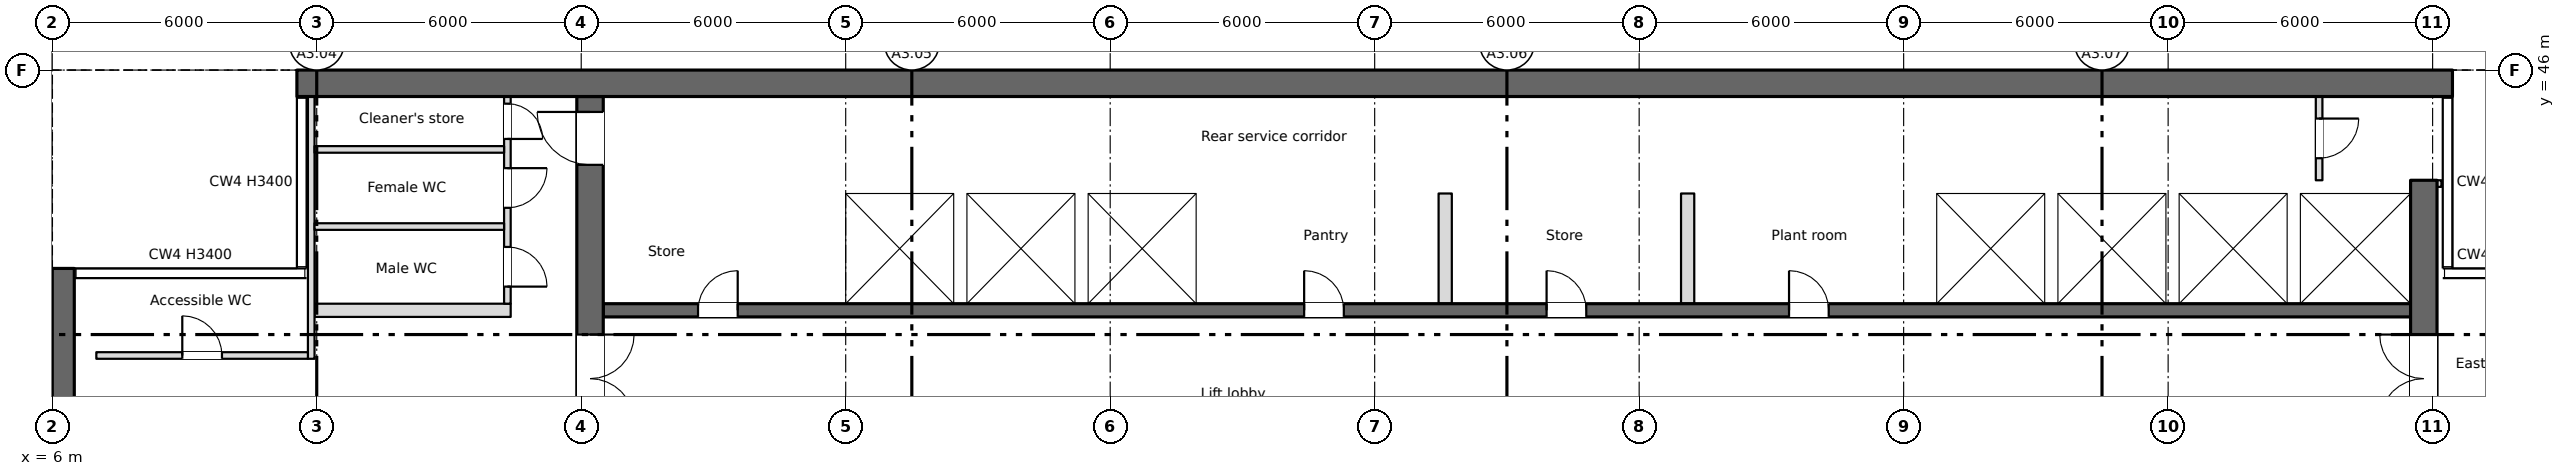
"""IFC4 building model, lengths in metres.
Left out: names, types, materials, properties, quantities, classifications, styles, units other than length and angle.
Written with IfcOpenShell. Run it as: python <this file> out.ifc"""

import sys

from ifc_helpers import new_model, si_unit, direction, frame, frame_2d, origin, place, context, subcontext, project, spatial, rectangle, extrude, element, fill, save


model = new_model("IFC4")
c1 = context("Model", 3, precision=1e-05, world=origin(), true_north=direction((0.0, 1.0)))
c2 = subcontext(c1, "Body", "Model", "MODEL_VIEW")
j1 = project(units=[si_unit("LENGTHUNIT", "METRE"), si_unit("PLANEANGLEUNIT", "RADIAN")], contexts=[c1])
p1 = place(None, origin())
s1 = spatial("IfcSite", under=j1, at=p1, CompositionType="ELEMENT")
p2 = place(p1, origin())
s2 = spatial("IfcBuilding", under=s1, at=p2, CompositionType="ELEMENT")
p3 = place(p2, frame((0.0, 0.0, 250.75)))
s3 = spatial("IfcBuildingStorey", under=s2, at=p3, CompositionType="ELEMENT", Elevation=250.75)
p4 = place(p3, frame((6.25, 8.5, 0.0), z_axis=(0.0, 0.0, 1.0), x_axis=(0.0, 1.0, 0.0)))
e1 = element("IfcWall", 1, at=p4, inside=s3, PredefinedType="SHEAR", context=c2, shape_type="SweptSolid", body=[
    extrude(rectangle(XDim=33.0, YDim=0.5, at=frame_2d((16.5, 0.0))), origin(), (0.0, 0.0, 1.0), 3.4),
])
p5 = place(p4, frame((1.2, 0.0, 0.6)))
e2 = element("IfcOpeningElement", 2, at=p5, cuts=e1, PredefinedType="OPENING", context=c2, shape_type="SweptSolid", body=[
    extrude(rectangle(XDim=0.6, YDim=2.4, at=frame_2d((0.3, 1.2))), frame((0.0, 0.26, 0.0), z_axis=(0.0, -1.0, 0.0), x_axis=(1.0, 0.0, 0.0)), (0.0, 0.0, 1.0), 0.52),
])
p6 = place(p4, frame((7.2, 0.0, 0.6)))
e3 = element("IfcOpeningElement", 3, at=p6, cuts=e1, PredefinedType="OPENING", context=c2, shape_type="SweptSolid", body=[
    extrude(rectangle(XDim=0.6, YDim=2.4, at=frame_2d((0.3, 1.2))), frame((0.0, 0.26, 0.0), z_axis=(0.0, -1.0, 0.0), x_axis=(1.0, 0.0, 0.0)), (0.0, 0.0, 1.0), 0.52),
])
p7 = place(p4, frame((13.2, 0.0, 0.6)))
e4 = element("IfcOpeningElement", 4, at=p7, cuts=e1, PredefinedType="OPENING", context=c2, shape_type="SweptSolid", body=[
    extrude(rectangle(XDim=0.6, YDim=2.4, at=frame_2d((0.3, 1.2))), frame((0.0, 0.26, 0.0), z_axis=(0.0, -1.0, 0.0), x_axis=(1.0, 0.0, 0.0)), (0.0, 0.0, 1.0), 0.52),
])
p8 = place(p3, frame((11.55, 45.7, 0.0), z_axis=(0.0, 0.0, 1.0), x_axis=(1.0, 0.0, 0.0)))
e5 = element("IfcWall", 5, at=p8, inside=s3, PredefinedType="SHEAR", context=c2, shape_type="SweptSolid", body=[
    extrude(rectangle(XDim=48.9, YDim=0.6, at=frame_2d((24.45, 0.0))), origin(), (0.0, 0.0, 1.0), 3.4),
])
p9 = place(p3, frame((6.75, 28.4, 0.0), z_axis=(0.0, 0.0, 1.0), x_axis=(0.0, 1.0, 0.0)))
e6 = element("IfcWall", 6, at=p9, inside=s3, PredefinedType="SHEAR", context=c2, shape_type="SweptSolid", body=[
    extrude(rectangle(XDim=12.85, YDim=0.5, at=frame_2d((6.425, 0.0))), origin(), (0.0, 0.0, 1.0), 3.4),
])
p10 = place(p3, frame((18.2, 28.4, 0.0), z_axis=(0.0, 0.0, 1.0), x_axis=(0.0, 1.0, 0.0)))
e7 = element("IfcWall", 7, at=p10, inside=s3, PredefinedType="SHEAR", context=c2, shape_type="SweptSolid", body=[
    extrude(rectangle(XDim=17.0, YDim=0.6, at=frame_2d((8.5, 0.0))), origin(), (0.0, 0.0, 1.0), 3.4),
])
p11 = place(p10, frame((9.6, 0.0, 0.0)))
e8 = element("IfcOpeningElement", 8, at=p11, cuts=e7, PredefinedType="OPENING", context=c2, shape_type="SweptSolid", body=[
    extrude(rectangle(XDim=2.0, YDim=2.1, at=frame_2d((1.0, 1.05))), frame((0.0, 0.31, 0.0), z_axis=(0.0, -1.0, 0.0), x_axis=(1.0, 0.0, 0.0)), (0.0, 0.0, 1.0), 0.62),
])
p12 = place(p10, frame((15.45, 0.0, 0.0)))
e9 = element("IfcOpeningElement", 9, at=p12, cuts=e7, PredefinedType="OPENING", context=c2, shape_type="SweptSolid", body=[
    extrude(rectangle(XDim=1.2, YDim=2.1, at=frame_2d((0.6, 1.05))), frame((0.0, 0.31, 0.0), z_axis=(0.0, -1.0, 0.0), x_axis=(1.0, 0.0, 0.0)), (0.0, 0.0, 1.0), 0.62),
])
p13 = place(p3, frame((59.8, 28.4, 0.0), z_axis=(0.0, 0.0, 1.0), x_axis=(0.0, 1.0, 0.0)))
e10 = element("IfcWall", 10, at=p13, inside=s3, PredefinedType="SHEAR", context=c2, shape_type="SweptSolid", body=[
    extrude(rectangle(XDim=15.1, YDim=0.6, at=frame_2d((7.55, 0.0))), origin(), (0.0, 0.0, 1.0), 3.4),
])
p14 = place(p13, frame((9.6, 0.0, 0.0)))
e11 = element("IfcOpeningElement", 11, at=p14, cuts=e10, PredefinedType="OPENING", context=c2, shape_type="SweptSolid", body=[
    extrude(rectangle(XDim=2.0, YDim=2.1, at=frame_2d((1.0, 1.05))), frame((0.0, 0.31, 0.0), z_axis=(0.0, -1.0, 0.0), x_axis=(1.0, 0.0, 0.0)), (0.0, 0.0, 1.0), 0.62),
])
p15 = place(p3, frame((18.5, 40.55, 0.0), z_axis=(0.0, 0.0, 1.0), x_axis=(1.0, 0.0, 0.0)))
e12 = element("IfcWall", 12, at=p15, inside=s3, PredefinedType="SHEAR", context=c2, shape_type="SweptSolid", body=[
    extrude(rectangle(XDim=41.0, YDim=0.3, at=frame_2d((20.5, 0.0))), origin(), (0.0, 0.0, 1.0), 3.4),
])
p16 = place(p15, frame((2.15, 0.0, 0.0)))
e13 = element("IfcOpeningElement", 13, at=p16, cuts=e12, PredefinedType="OPENING", context=c2, shape_type="SweptSolid", body=[
    extrude(rectangle(XDim=0.9, YDim=2.1, at=frame_2d((0.45, 1.05))), frame((0.0, 0.16, 0.0), z_axis=(0.0, -1.0, 0.0), x_axis=(1.0, 0.0, 0.0)), (0.0, 0.0, 1.0), 0.32),
])
p17 = place(p15, frame((15.9, 0.0, 0.0)))
e14 = element("IfcOpeningElement", 14, at=p17, cuts=e12, PredefinedType="OPENING", context=c2, shape_type="SweptSolid", body=[
    extrude(rectangle(XDim=0.9, YDim=2.1, at=frame_2d((0.45, 1.05))), frame((0.0, 0.16, 0.0), z_axis=(0.0, -1.0, 0.0), x_axis=(1.0, 0.0, 0.0)), (0.0, 0.0, 1.0), 0.32),
])
p18 = place(p15, frame((21.4, 0.0, 0.0)))
e15 = element("IfcOpeningElement", 15, at=p18, cuts=e12, PredefinedType="OPENING", context=c2, shape_type="SweptSolid", body=[
    extrude(rectangle(XDim=0.9, YDim=2.1, at=frame_2d((0.45, 1.05))), frame((0.0, 0.16, 0.0), z_axis=(0.0, -1.0, 0.0), x_axis=(1.0, 0.0, 0.0)), (0.0, 0.0, 1.0), 0.32),
])
p19 = place(p15, frame((26.9, 0.0, 0.0)))
e16 = element("IfcOpeningElement", 16, at=p19, cuts=e12, PredefinedType="OPENING", context=c2, shape_type="SweptSolid", body=[
    extrude(rectangle(XDim=0.9, YDim=2.1, at=frame_2d((0.45, 1.05))), frame((0.0, 0.16, 0.0), z_axis=(0.0, -1.0, 0.0), x_axis=(1.0, 0.0, 0.0)), (0.0, 0.0, 1.0), 0.32),
])
p20 = place(p15, frame((6.175, 0.0, 0.0)))
e17 = element("IfcOpeningElement", 17, at=p20, cuts=e12, PredefinedType="OPENING", context=c2, shape_type="SweptSolid", body=[
    extrude(rectangle(XDim=1.1, YDim=2.1, at=frame_2d((0.55, 1.05))), frame((0.0, 0.16, 0.0), z_axis=(0.0, -1.0, 0.0), x_axis=(1.0, 0.0, 0.0)), (0.0, 0.0, 1.0), 0.32),
])
p21 = place(p15, frame((8.925, 0.0, 0.0)))
e18 = element("IfcOpeningElement", 18, at=p21, cuts=e12, PredefinedType="OPENING", context=c2, shape_type="SweptSolid", body=[
    extrude(rectangle(XDim=1.1, YDim=2.1, at=frame_2d((0.55, 1.05))), frame((0.0, 0.16, 0.0), z_axis=(0.0, -1.0, 0.0), x_axis=(1.0, 0.0, 0.0)), (0.0, 0.0, 1.0), 0.32),
])
p22 = place(p15, frame((11.675, 0.0, 0.0)))
e19 = element("IfcOpeningElement", 19, at=p22, cuts=e12, PredefinedType="OPENING", context=c2, shape_type="SweptSolid", body=[
    extrude(rectangle(XDim=1.1, YDim=2.1, at=frame_2d((0.55, 1.05))), frame((0.0, 0.16, 0.0), z_axis=(0.0, -1.0, 0.0), x_axis=(1.0, 0.0, 0.0)), (0.0, 0.0, 1.0), 0.32),
])
p23 = place(p15, frame((30.925, 0.0, 0.0)))
e20 = element("IfcOpeningElement", 20, at=p23, cuts=e12, PredefinedType="OPENING", context=c2, shape_type="SweptSolid", body=[
    extrude(rectangle(XDim=1.1, YDim=2.1, at=frame_2d((0.55, 1.05))), frame((0.0, 0.16, 0.0), z_axis=(0.0, -1.0, 0.0), x_axis=(1.0, 0.0, 0.0)), (0.0, 0.0, 1.0), 0.32),
])
p24 = place(p15, frame((33.675, 0.0, 0.0)))
e21 = element("IfcOpeningElement", 21, at=p24, cuts=e12, PredefinedType="OPENING", context=c2, shape_type="SweptSolid", body=[
    extrude(rectangle(XDim=1.1, YDim=2.1, at=frame_2d((0.55, 1.05))), frame((0.0, 0.16, 0.0), z_axis=(0.0, -1.0, 0.0), x_axis=(1.0, 0.0, 0.0)), (0.0, 0.0, 1.0), 0.32),
])
p25 = place(p15, frame((36.375, 0.0, 0.0)))
e22 = element("IfcOpeningElement", 22, at=p25, cuts=e12, PredefinedType="OPENING", context=c2, shape_type="SweptSolid", body=[
    extrude(rectangle(XDim=1.2, YDim=2.1, at=frame_2d((0.6, 1.05))), frame((0.0, 0.16, 0.0), z_axis=(0.0, -1.0, 0.0), x_axis=(1.0, 0.0, 0.0)), (0.0, 0.0, 1.0), 0.32),
])
p26 = place(p15, frame((39.15, 0.0, 0.0)))
e23 = element("IfcOpeningElement", 23, at=p26, cuts=e12, PredefinedType="OPENING", context=c2, shape_type="SweptSolid", body=[
    extrude(rectangle(XDim=1.2, YDim=2.1, at=frame_2d((0.6, 1.05))), frame((0.0, 0.16, 0.0), z_axis=(0.0, -1.0, 0.0), x_axis=(1.0, 0.0, 0.0)), (0.0, 0.0, 1.0), 0.32),
])
p27 = place(p3, frame((18.5, 43.35, 0.0), z_axis=(0.0, 0.0, 1.0), x_axis=(1.0, 0.0, 0.0)))
e24 = element("IfcWall", 24, at=p27, inside=s3, PredefinedType="SHEAR", context=c2, shape_type="SweptSolid", body=[
    extrude(rectangle(XDim=41.0, YDim=0.3, at=frame_2d((20.5, 0.0))), origin(), (0.0, 0.0, 1.0), 3.4),
])
p28 = place(p3, frame((11.95, 40.55, 0.0), z_axis=(0.0, 0.0, 1.0), x_axis=(1.0, 0.0, 0.0)))
e25 = element("IfcWall", 25, at=p28, inside=s3, PredefinedType="PARTITIONING", context=c2, shape_type="SweptSolid", body=[
    extrude(rectangle(XDim=4.45, YDim=0.3, at=frame_2d((2.225, 0.0))), origin(), (0.0, 0.0, 1.0), 3.4),
])
for number, where, z_axis, x_axis in (
    (26, (23.85, 40.7, 0.0), (0.0, 0.0, 1.0), (0.0, 1.0, 0.0)),
    (27, (26.6, 40.7, 0.0), (0.0, 0.0, 1.0), (0.0, 1.0, 0.0)),
    (28, (29.35, 40.7, 0.0), (0.0, 0.0, 1.0), (0.0, 1.0, 0.0)),
    (29, (32.1, 40.7, 0.0), (0.0, 0.0, 1.0), (0.0, 1.0, 0.0)),
    (30, (48.6, 40.7, 0.0), (0.0, 0.0, 1.0), (0.0, 1.0, 0.0)),
    (31, (51.35, 40.7, 0.0), (0.0, 0.0, 1.0), (0.0, 1.0, 0.0)),
    (32, (54.1, 40.7, 0.0), (0.0, 0.0, 1.0), (0.0, 1.0, 0.0)),
    (33, (56.85, 40.7, 0.0), (0.0, 0.0, 1.0), (0.0, 1.0, 0.0)),
):
    element("IfcWall", number, at=place(p3, frame(where, z_axis=z_axis, x_axis=x_axis)), inside=s3, PredefinedType="SHEAR", context=c2, shape_type="SweptSolid", body=[
        extrude(rectangle(XDim=2.5, YDim=0.3, at=frame_2d((1.25, 0.0))), origin(), (0.0, 0.0, 1.0), 3.4),
    ])
p29 = place(p3, frame((16.325, 45.4, 0.0), z_axis=(0.0, 0.0, 1.0), x_axis=(0.0, -1.0, 0.0)))
e34 = element("IfcWall", 34, at=p29, inside=s3, PredefinedType="PARTITIONING", context=c2, shape_type="SweptSolid", body=[
    extrude(rectangle(XDim=4.7, YDim=0.15, at=frame_2d((2.35, 0.0))), origin(), (0.0, 0.0, 1.0), 3.4),
])
p30 = place(p29, frame((3.413, 0.0, 0.0)))
e35 = element("IfcOpeningElement", 35, at=p30, cuts=e34, PredefinedType="OPENING", context=c2, shape_type="SweptSolid", body=[
    extrude(rectangle(XDim=0.9, YDim=2.1, at=frame_2d((0.45, 1.05))), frame((0.0, 0.085, 0.0), z_axis=(0.0, -1.0, 0.0), x_axis=(1.0, 0.0, 0.0)), (0.0, 0.0, 1.0), 0.17),
])
p31 = place(p29, frame((1.625, 0.0, 0.0)))
e36 = element("IfcOpeningElement", 36, at=p31, cuts=e34, PredefinedType="OPENING", context=c2, shape_type="SweptSolid", body=[
    extrude(rectangle(XDim=0.9, YDim=2.1, at=frame_2d((0.45, 1.05))), frame((0.0, 0.085, 0.0), z_axis=(0.0, -1.0, 0.0), x_axis=(1.0, 0.0, 0.0)), (0.0, 0.0, 1.0), 0.17),
])
p32 = place(p29, frame((0.163, 0.0, 0.0)))
e37 = element("IfcOpeningElement", 37, at=p32, cuts=e34, PredefinedType="OPENING", context=c2, shape_type="SweptSolid", body=[
    extrude(rectangle(XDim=0.8, YDim=2.1, at=frame_2d((0.4, 1.05))), frame((0.0, 0.085, 0.0), z_axis=(0.0, -1.0, 0.0), x_axis=(1.0, 0.0, 0.0)), (0.0, 0.0, 1.0), 0.17),
])
p33 = place(p3, frame((11.875, 39.45, 0.0), z_axis=(0.0, 0.0, 1.0), x_axis=(0.0, 1.0, 0.0)))
e38 = element("IfcWall", 38, at=p33, inside=s3, PredefinedType="PARTITIONING", context=c2, shape_type="SweptSolid", body=[
    extrude(rectangle(XDim=5.95, YDim=0.15, at=frame_2d((2.975, 0.0))), origin(), (0.0, 0.0, 1.0), 3.4),
])
p34 = place(p3, frame((7.0, 39.525, 0.0), z_axis=(0.0, 0.0, 1.0), x_axis=(1.0, 0.0, 0.0)))
e39 = element("IfcWall", 39, at=p34, inside=s3, PredefinedType="PARTITIONING", context=c2, shape_type="SweptSolid", body=[
    extrude(rectangle(XDim=4.8, YDim=0.15, at=frame_2d((2.4, 0.0))), origin(), (0.0, 0.0, 1.0), 3.4),
])
p35 = place(p34, frame((1.95, 0.0, 0.0)))
e40 = element("IfcOpeningElement", 40, at=p35, cuts=e39, PredefinedType="OPENING", context=c2, shape_type="SweptSolid", body=[
    extrude(rectangle(XDim=0.9, YDim=2.1, at=frame_2d((0.45, 1.05))), frame((0.0, 0.085, 0.0), z_axis=(0.0, -1.0, 0.0), x_axis=(1.0, 0.0, 0.0)), (0.0, 0.0, 1.0), 0.17),
])
for number, where, z_axis, x_axis in (
    (41, (11.95, 42.45, 0.0), (0.0, 0.0, 1.0), (1.0, 0.0, 0.0)),
    (42, (11.95, 44.2, 0.0), (0.0, 0.0, 1.0), (1.0, 0.0, 0.0)),
):
    element("IfcWall", number, at=place(p3, frame(where, z_axis=z_axis, x_axis=x_axis)), inside=s3, PredefinedType="PARTITIONING", context=c2, shape_type="SweptSolid", body=[
        extrude(rectangle(XDim=4.3, YDim=0.15, at=frame_2d((2.15, 0.0))), origin(), (0.0, 0.0, 1.0), 3.4),
    ])
p36 = place(p3, frame((57.425, 45.4, 0.0), z_axis=(0.0, 0.0, 1.0), x_axis=(0.0, -1.0, 0.0)))
e43 = element("IfcWall", 43, at=p36, inside=s3, PredefinedType="PARTITIONING", context=c2, shape_type="SweptSolid", body=[
    extrude(rectangle(XDim=1.9, YDim=0.15, at=frame_2d((0.95, 0.0))), origin(), (0.0, 0.0, 1.0), 3.4),
])
p37 = place(p36, frame((0.5, 0.0, 0.0)))
e44 = element("IfcOpeningElement", 44, at=p37, cuts=e43, PredefinedType="OPENING", context=c2, shape_type="SweptSolid", body=[
    extrude(rectangle(XDim=0.9, YDim=2.1, at=frame_2d((0.45, 1.05))), frame((0.0, 0.085, 0.0), z_axis=(0.0, -1.0, 0.0), x_axis=(1.0, 0.0, 0.0)), (0.0, 0.0, 1.0), 0.17),
])
p38 = place(p3, frame((60.15, 43.35, 0.0), z_axis=(0.0, 0.0, 1.0), x_axis=(0.0, 1.0, 0.0)))
e45 = element("IfcWall", 45, at=p38, inside=s3, PredefinedType="PARTITIONING", context=c2, shape_type="SweptSolid", body=[
    extrude(rectangle(XDim=0.15, YDim=0.1, at=frame_2d((0.075, 0.0))), origin(), (0.0, 0.0, 1.0), 3.4),
])
for number, where, z_axis, x_axis in (
    (46, (37.6, 40.7, 0.0), (0.0, 0.0, 1.0), (0.0, 1.0, 0.0)),
    (47, (43.1, 40.7, 0.0), (0.0, 0.0, 1.0), (0.0, 1.0, 0.0)),
):
    element("IfcWall", number, at=place(p3, frame(where, z_axis=z_axis, x_axis=x_axis)), inside=s3, PredefinedType="PARTITIONING", context=c2, shape_type="SweptSolid", body=[
        extrude(rectangle(XDim=2.5, YDim=0.3, at=frame_2d((1.25, 0.0))), origin(), (0.0, 0.0, 1.0), 3.4),
    ])
p39 = place(p35, origin())
e48 = element("IfcDoor", 48, at=p39, inside=s3, OperationType="SINGLE_SWING_LEFT", PredefinedType="DOOR", context=c2, shape_type="SweptSolid", body=[
    extrude(rectangle(XDim=0.9, YDim=2.1, at=frame_2d((0.45, 1.05))), frame((0.0, 0.025, 0.0), z_axis=(0.0, -1.0, 0.0), x_axis=(1.0, 0.0, 0.0)), (0.0, 0.0, 1.0), 0.05),
])
fill(e40, e48)
p40 = place(p30, origin())
e49 = element("IfcDoor", 49, at=p40, inside=s3, OperationType="SINGLE_SWING_RIGHT", PredefinedType="DOOR", context=c2, shape_type="SweptSolid", body=[
    extrude(rectangle(XDim=0.9, YDim=2.1, at=frame_2d((0.45, 1.05))), frame((0.0, 0.025, 0.0), z_axis=(0.0, -1.0, 0.0), x_axis=(1.0, 0.0, 0.0)), (0.0, 0.0, 1.0), 0.05),
])
fill(e35, e49)
p41 = place(p31, origin())
e50 = element("IfcDoor", 50, at=p41, inside=s3, OperationType="SINGLE_SWING_LEFT", PredefinedType="DOOR", context=c2, shape_type="SweptSolid", body=[
    extrude(rectangle(XDim=0.9, YDim=2.1, at=frame_2d((0.45, 1.05))), frame((0.0, 0.025, 0.0), z_axis=(0.0, -1.0, 0.0), x_axis=(1.0, 0.0, 0.0)), (0.0, 0.0, 1.0), 0.05),
])
fill(e36, e50)
p42 = place(p32, origin())
e51 = element("IfcDoor", 51, at=p42, inside=s3, OperationType="SINGLE_SWING_RIGHT", PredefinedType="DOOR", context=c2, shape_type="SweptSolid", body=[
    extrude(rectangle(XDim=0.8, YDim=2.1, at=frame_2d((0.4, 1.05))), frame((0.0, 0.025, 0.0), z_axis=(0.0, -1.0, 0.0), x_axis=(1.0, 0.0, 0.0)), (0.0, 0.0, 1.0), 0.05),
])
fill(e37, e51)
p43 = place(p37, origin())
e52 = element("IfcDoor", 52, at=p43, inside=s3, OperationType="SINGLE_SWING_LEFT", PredefinedType="DOOR", context=c2, shape_type="SweptSolid", body=[
    extrude(rectangle(XDim=0.9, YDim=2.1, at=frame_2d((0.45, 1.05))), frame((0.0, 0.025, 0.0), z_axis=(0.0, -1.0, 0.0), x_axis=(1.0, 0.0, 0.0)), (0.0, 0.0, 1.0), 0.05),
])
fill(e44, e52)
p44 = place(p16, origin())
e53 = element("IfcDoor", 53, at=p44, inside=s3, OperationType="SINGLE_SWING_RIGHT", PredefinedType="DOOR", context=c2, shape_type="SweptSolid", body=[
    extrude(rectangle(XDim=0.9, YDim=2.1, at=frame_2d((0.45, 1.05))), frame((0.0, 0.025, 0.0), z_axis=(0.0, -1.0, 0.0), x_axis=(1.0, 0.0, 0.0)), (0.0, 0.0, 1.0), 0.05),
])
fill(e13, e53)
p45 = place(p17, origin())
e54 = element("IfcDoor", 54, at=p45, inside=s3, OperationType="SINGLE_SWING_LEFT", PredefinedType="DOOR", context=c2, shape_type="SweptSolid", body=[
    extrude(rectangle(XDim=0.9, YDim=2.1, at=frame_2d((0.45, 1.05))), frame((0.0, 0.025, 0.0), z_axis=(0.0, -1.0, 0.0), x_axis=(1.0, 0.0, 0.0)), (0.0, 0.0, 1.0), 0.05),
])
fill(e14, e54)
p46 = place(p18, origin())
e55 = element("IfcDoor", 55, at=p46, inside=s3, OperationType="SINGLE_SWING_LEFT", PredefinedType="DOOR", context=c2, shape_type="SweptSolid", body=[
    extrude(rectangle(XDim=0.9, YDim=2.1, at=frame_2d((0.45, 1.05))), frame((0.0, 0.025, 0.0), z_axis=(0.0, -1.0, 0.0), x_axis=(1.0, 0.0, 0.0)), (0.0, 0.0, 1.0), 0.05),
])
fill(e15, e55)
p47 = place(p19, origin())
e56 = element("IfcDoor", 56, at=p47, inside=s3, OperationType="SINGLE_SWING_LEFT", PredefinedType="DOOR", context=c2, shape_type="SweptSolid", body=[
    extrude(rectangle(XDim=0.9, YDim=2.1, at=frame_2d((0.45, 1.05))), frame((0.0, 0.025, 0.0), z_axis=(0.0, -1.0, 0.0), x_axis=(1.0, 0.0, 0.0)), (0.0, 0.0, 1.0), 0.05),
])
fill(e16, e56)
p48 = place(p20, origin())
e57 = element("IfcDoor", 57, at=p48, inside=s3, OperationType="SLIDING_TO_LEFT", PredefinedType="DOOR", context=c2, shape_type="SweptSolid", body=[
    extrude(rectangle(XDim=1.1, YDim=2.1, at=frame_2d((0.55, 1.05))), frame((0.0, 0.025, 0.0), z_axis=(0.0, -1.0, 0.0), x_axis=(1.0, 0.0, 0.0)), (0.0, 0.0, 1.0), 0.05),
])
fill(e17, e57)
p49 = place(p21, origin())
e58 = element("IfcDoor", 58, at=p49, inside=s3, OperationType="SLIDING_TO_LEFT", PredefinedType="DOOR", context=c2, shape_type="SweptSolid", body=[
    extrude(rectangle(XDim=1.1, YDim=2.1, at=frame_2d((0.55, 1.05))), frame((0.0, 0.025, 0.0), z_axis=(0.0, -1.0, 0.0), x_axis=(1.0, 0.0, 0.0)), (0.0, 0.0, 1.0), 0.05),
])
fill(e18, e58)
p50 = place(p22, origin())
e59 = element("IfcDoor", 59, at=p50, inside=s3, OperationType="SLIDING_TO_LEFT", PredefinedType="DOOR", context=c2, shape_type="SweptSolid", body=[
    extrude(rectangle(XDim=1.1, YDim=2.1, at=frame_2d((0.55, 1.05))), frame((0.0, 0.025, 0.0), z_axis=(0.0, -1.0, 0.0), x_axis=(1.0, 0.0, 0.0)), (0.0, 0.0, 1.0), 0.05),
])
fill(e19, e59)
p51 = place(p23, origin())
e60 = element("IfcDoor", 60, at=p51, inside=s3, OperationType="SLIDING_TO_LEFT", PredefinedType="DOOR", context=c2, shape_type="SweptSolid", body=[
    extrude(rectangle(XDim=1.1, YDim=2.1, at=frame_2d((0.55, 1.05))), frame((0.0, 0.025, 0.0), z_axis=(0.0, -1.0, 0.0), x_axis=(1.0, 0.0, 0.0)), (0.0, 0.0, 1.0), 0.05),
])
fill(e20, e60)
p52 = place(p24, origin())
e61 = element("IfcDoor", 61, at=p52, inside=s3, OperationType="SLIDING_TO_LEFT", PredefinedType="DOOR", context=c2, shape_type="SweptSolid", body=[
    extrude(rectangle(XDim=1.1, YDim=2.1, at=frame_2d((0.55, 1.05))), frame((0.0, 0.025, 0.0), z_axis=(0.0, -1.0, 0.0), x_axis=(1.0, 0.0, 0.0)), (0.0, 0.0, 1.0), 0.05),
])
fill(e21, e61)
p53 = place(p25, origin())
e62 = element("IfcDoor", 62, at=p53, inside=s3, OperationType="SLIDING_TO_LEFT", PredefinedType="DOOR", context=c2, shape_type="SweptSolid", body=[
    extrude(rectangle(XDim=1.2, YDim=2.1, at=frame_2d((0.6, 1.05))), frame((0.0, 0.025, 0.0), z_axis=(0.0, -1.0, 0.0), x_axis=(1.0, 0.0, 0.0)), (0.0, 0.0, 1.0), 0.05),
])
fill(e22, e62)
p54 = place(p26, origin())
e63 = element("IfcDoor", 63, at=p54, inside=s3, OperationType="SLIDING_TO_LEFT", PredefinedType="DOOR", context=c2, shape_type="SweptSolid", body=[
    extrude(rectangle(XDim=1.2, YDim=2.1, at=frame_2d((0.6, 1.05))), frame((0.0, 0.025, 0.0), z_axis=(0.0, -1.0, 0.0), x_axis=(1.0, 0.0, 0.0)), (0.0, 0.0, 1.0), 0.05),
])
fill(e23, e63)
p55 = place(p11, origin())
e64 = element("IfcDoor", 64, at=p55, inside=s3, OperationType="DOUBLE_DOOR_SINGLE_SWING", PredefinedType="DOOR", context=c2, shape_type="SweptSolid", body=[
    extrude(rectangle(XDim=2.0, YDim=2.1, at=frame_2d((1.0, 1.05))), frame((0.0, 0.025, 0.0), z_axis=(0.0, -1.0, 0.0), x_axis=(1.0, 0.0, 0.0)), (0.0, 0.0, 1.0), 0.05),
])
fill(e8, e64)
p56 = place(p14, origin())
e65 = element("IfcDoor", 65, at=p56, inside=s3, OperationType="DOUBLE_DOOR_SINGLE_SWING", PredefinedType="DOOR", context=c2, shape_type="SweptSolid", body=[
    extrude(rectangle(XDim=2.0, YDim=2.1, at=frame_2d((1.0, 1.05))), frame((0.0, 0.025, 0.0), z_axis=(0.0, -1.0, 0.0), x_axis=(1.0, 0.0, 0.0)), (0.0, 0.0, 1.0), 0.05),
])
fill(e11, e65)
p57 = place(p12, origin())
e66 = element("IfcDoor", 66, at=p57, inside=s3, OperationType="SINGLE_SWING_RIGHT", PredefinedType="DOOR", context=c2, shape_type="SweptSolid", body=[
    extrude(rectangle(XDim=1.2, YDim=2.1, at=frame_2d((0.6, 1.05))), frame((0.0, 0.025, 0.0), z_axis=(0.0, -1.0, 0.0), x_axis=(1.0, 0.0, 0.0)), (0.0, 0.0, 1.0), 0.05),
])
fill(e9, e66)
save(model, sys.argv[1])
